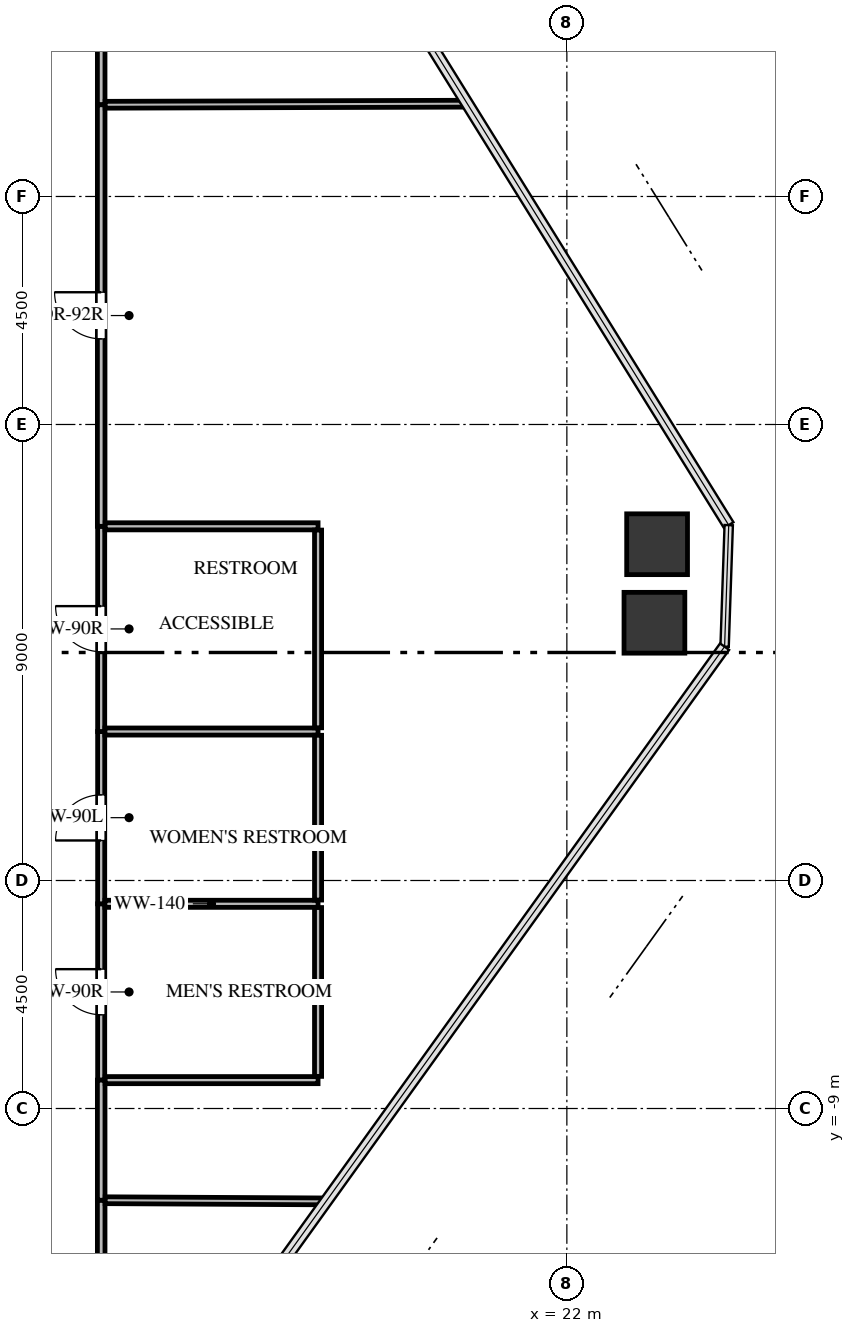
"""IFC4 building model, lengths in metres.
Left out: names, types, materials, properties, quantities, classifications, styles, units other than length and angle.
Written with IfcOpenShell. Run it as: python <this file> out.ifc"""

import sys

from ifc_helpers import new_model, si_unit, direction, frame, frame_2d, origin, origin_2d, place, context, subcontext, project, spatial, rectangle, extrude, source, transform, mapped, element, fill, save


model = new_model("IFC4")
c1 = context("Model", 3, precision=1e-05, world=origin(), true_north=direction((0.0, 1.0)))
c2 = subcontext(c1, "Body", "Model", "MODEL_VIEW")
j1 = project(units=[si_unit("LENGTHUNIT", "METRE"), si_unit("PLANEANGLEUNIT", "RADIAN")], contexts=[c1])
p1 = place(None, origin())
s1 = spatial("IfcSite", under=j1, at=p1, CompositionType="ELEMENT")
p2 = place(p1, origin())
s2 = spatial("IfcBuilding", under=s1, at=p2, CompositionType="ELEMENT")
p3 = place(p2, frame((0.0, 0.0, 93.3)))
s3 = spatial("IfcBuildingStorey", under=s2, at=p3, CompositionType="ELEMENT", Elevation=93.3)
m1 = source(origin(), c2, "Body", "SweptSolid", [
    extrude(rectangle(XDim=1.2, YDim=1.2, at=origin_2d()), origin(), (0.0, 0.0, 1.0), 4.26),
])
for number, where, z_axis, x_axis in (
    (1, (23.781, 2.137, -0.3), (0.0, 0.0, 1.0), (1.0, 0.0, 0.0)),
    (2, (23.728, 0.587, -0.3), (0.0, 0.0, 1.0), (1.0, 0.0, 0.0)),
):
    element("IfcColumn", number, at=place(p3, frame(where, z_axis=z_axis, x_axis=x_axis)), inside=s3, PredefinedType="COLUMN", context=c2, shape_type="MappedRepresentation", body=[
        mapped(m1, transform((0.0, 0.0, 0.0), x_axis=(1.0, 0.0, 0.0), y_axis=(0.0, 1.0, 0.0), z_axis=(0.0, 0.0, 1.0), scale=1.0)),
    ])
p4 = place(p3, frame((12.81, -8.44, 0.0), z_axis=(0.0, 0.0, 1.0), x_axis=(0.0, 1.0, 0.0)))
e3 = element("IfcWall", 3, at=p4, inside=s3, PredefinedType="PARTITIONING", context=c2, shape_type="SweptSolid", body=[
    extrude(rectangle(XDim=3.48, YDim=0.14, at=frame_2d((1.74, 0.0))), origin(), (0.0, 0.0, 1.0), 3.945),
])
p5 = place(p4, frame((1.29, 0.0, 0.0)))
e4 = element("IfcOpeningElement", 4, at=p5, cuts=e3, PredefinedType="OPENING", context=c2, shape_type="SweptSolid", body=[
    extrude(rectangle(XDim=0.9, YDim=2.05, at=frame_2d((0.45, 1.025))), frame((0.0, 0.08, 0.0), z_axis=(0.0, -1.0, 0.0), x_axis=(1.0, 0.0, 0.0)), (0.0, 0.0, 1.0), 0.16),
])
p6 = place(p3, frame((12.81, -4.96, 0.0), z_axis=(0.0, 0.0, 1.0), x_axis=(0.0, 1.0, 0.0)))
e5 = element("IfcWall", 5, at=p6, inside=s3, PredefinedType="PARTITIONING", context=c2, shape_type="SweptSolid", body=[
    extrude(rectangle(XDim=3.4, YDim=0.14, at=frame_2d((1.7, 0.0))), origin(), (0.0, 0.0, 1.0), 3.945),
])
p7 = place(p6, frame((1.25, 0.0, 0.0)))
e6 = element("IfcOpeningElement", 6, at=p7, cuts=e5, PredefinedType="OPENING", context=c2, shape_type="SweptSolid", body=[
    extrude(rectangle(XDim=0.9, YDim=2.05, at=frame_2d((0.45, 1.025))), frame((0.0, 0.08, 0.0), z_axis=(0.0, -1.0, 0.0), x_axis=(1.0, 0.0, 0.0)), (0.0, 0.0, 1.0), 0.16),
])
p8 = place(p3, frame((12.81, -1.56, 0.0), z_axis=(0.0, 0.0, 1.0), x_axis=(0.0, 1.0, 0.0)))
e7 = element("IfcWall", 7, at=p8, inside=s3, PredefinedType="PARTITIONING", context=c2, shape_type="SweptSolid", body=[
    extrude(rectangle(XDim=4.05, YDim=0.14, at=frame_2d((2.025, 0.0))), origin(), (0.0, 0.0, 1.0), 3.112),
])
p9 = place(p8, frame((1.575, 0.0, 0.0)))
e8 = element("IfcOpeningElement", 8, at=p9, cuts=e7, PredefinedType="OPENING", context=c2, shape_type="SweptSolid", body=[
    extrude(rectangle(XDim=0.9, YDim=2.05, at=frame_2d((0.45, 1.025))), frame((0.0, 0.08, 0.0), z_axis=(0.0, -1.0, 0.0), x_axis=(1.0, 0.0, 0.0)), (0.0, 0.0, 1.0), 0.16),
])
for number, where, z_axis, x_axis in (
    (9, (12.81, 10.81, 0.0), (0.0, 0.0, 1.0), (0.0, 1.0, 0.0)),
    (10, (12.81, -12.081, 0.0), (0.0, 0.0, 1.0), (0.0, 1.0, 0.0)),
):
    element("IfcWall", number, at=place(p3, frame(where, z_axis=z_axis, x_axis=x_axis)), inside=s3, PredefinedType="PARTITIONING", context=c2, shape_type="SweptSolid", body=[
        extrude(rectangle(XDim=1.271, YDim=0.15, at=frame_2d((0.635, 0.0))), origin(), (0.0, 0.0, 1.0), 3.945),
    ])
p10 = place(p3, frame((12.81, 2.49, 0.0), z_axis=(0.0, 0.0, 1.0), x_axis=(0.0, 1.0, 0.0)))
e11 = element("IfcWall", 11, at=p10, inside=s3, PredefinedType="PARTITIONING", context=c2, shape_type="SweptSolid", body=[
    extrude(rectangle(XDim=8.32, YDim=0.15, at=frame_2d((4.16, 0.0))), origin(), (0.0, 0.0, 1.0), 3.945),
])
p11 = place(p10, frame((3.7, 0.0, 0.0)))
e12 = element("IfcOpeningElement", 12, at=p11, cuts=e11, PredefinedType="OPENING", context=c2, shape_type="SweptSolid", body=[
    extrude(rectangle(XDim=0.92, YDim=2.1, at=frame_2d((0.46, 1.05))), frame((0.0, 0.085, 0.0), z_axis=(0.0, -1.0, 0.0), x_axis=(1.0, 0.0, 0.0)), (0.0, 0.0, 1.0), 0.17),
])
p12 = place(p3, frame((12.81, -10.81, 0.0), z_axis=(0.0, 0.0, 1.0), x_axis=(0.0, 1.0, 0.0)))
e13 = element("IfcWall", 13, at=p12, inside=s3, PredefinedType="PARTITIONING", context=c2, shape_type="SweptSolid", body=[
    extrude(rectangle(XDim=2.37, YDim=0.15, at=frame_2d((1.185, 0.0))), origin(), (0.0, 0.0, 1.0), 3.945),
])
p13 = place(p3, frame((12.884, -4.96, 0.0), z_axis=(0.0, 0.0, 1.0), x_axis=(1.0, 0.0, 0.0)))
e14 = element("IfcWall", 14, at=p13, inside=s3, PredefinedType="PARTITIONING", context=c2, shape_type="SweptSolid", body=[
    extrude(rectangle(XDim=4.206, YDim=0.14, at=frame_2d((2.103, 0.0))), origin(), (0.0, 0.0, 1.0), 3.945),
])
p14 = place(p3, frame((17.09, -8.44, 0.0), z_axis=(0.0, 0.0, 1.0), x_axis=(-1.0, 0.0, 0.0)))
e15 = element("IfcWall", 15, at=p14, inside=s3, PredefinedType="PARTITIONING", context=c2, shape_type="SweptSolid", body=[
    extrude(rectangle(XDim=4.201, YDim=0.14, at=frame_2d((2.101, 0.0))), origin(), (0.0, 0.0, 1.0), 3.28),
])
p15 = place(p3, frame((17.09, -5.034, 0.0), z_axis=(0.0, 0.0, 1.0), x_axis=(0.0, -1.0, 0.0)))
e16 = element("IfcWall", 16, at=p15, inside=s3, PredefinedType="PARTITIONING", context=c2, shape_type="SweptSolid", body=[
    extrude(rectangle(XDim=3.332, YDim=0.14, at=frame_2d((1.666, 0.0))), origin(), (0.0, 0.0, 1.0), 3.28),
])
p16 = place(p3, frame((12.884, -1.56, 0.0), z_axis=(0.0, 0.0, 1.0), x_axis=(1.0, 0.0, 0.0)))
e17 = element("IfcWall", 17, at=p16, inside=s3, PredefinedType="PARTITIONING", context=c2, shape_type="SweptSolid", body=[
    extrude(rectangle(XDim=4.206, YDim=0.14, at=frame_2d((2.103, 0.0))), origin(), (0.0, 0.0, 1.0), 3.945),
])
p17 = place(p3, frame((17.09, -1.634, 0.0), z_axis=(0.0, 0.0, 1.0), x_axis=(0.0, -1.0, 0.0)))
e18 = element("IfcWall", 18, at=p17, inside=s3, PredefinedType="PARTITIONING", context=c2, shape_type="SweptSolid", body=[
    extrude(rectangle(XDim=3.252, YDim=0.14, at=frame_2d((1.626, 0.0))), origin(), (0.0, 0.0, 1.0), 3.945),
])
p18 = place(p3, frame((12.889, 2.49, 0.0), z_axis=(0.0, 0.0, 1.0), x_axis=(1.0, 0.0, 0.0)))
e19 = element("IfcWall", 19, at=p18, inside=s3, PredefinedType="PARTITIONING", context=c2, shape_type="SweptSolid", body=[
    extrude(rectangle(XDim=4.201, YDim=0.14, at=frame_2d((2.101, 0.0))), origin(), (0.0, 0.0, 1.0), 3.945),
])
p19 = place(p3, frame((17.09, 2.416, 0.0), z_axis=(0.0, 0.0, 1.0), x_axis=(0.0, -1.0, 0.0)))
e20 = element("IfcWall", 20, at=p19, inside=s3, PredefinedType="PARTITIONING", context=c2, shape_type="SweptSolid", body=[
    extrude(rectangle(XDim=3.902, YDim=0.14, at=frame_2d((1.951, 0.0))), origin(), (0.0, 0.0, 1.0), 3.112),
])
p20 = place(p3, frame((20.035, 10.831, 0.0), z_axis=(0.0, 0.0, 1.0), x_axis=(-0.999995783715, -0.002903885812, 0.0)))
e21 = element("IfcWall", 21, at=p20, inside=s3, PredefinedType="PARTITIONING", context=c2, shape_type="SweptSolid", body=[
    extrude(rectangle(XDim=7.146, YDim=0.135, at=frame_2d((3.573, 0.0))), origin(), (0.0, 0.0, 1.0), 3.28),
])
p21 = place(p3, frame((12.889, -10.81, 0.0), z_axis=(0.0, 0.0, 1.0), x_axis=(0.999986140562, -0.005264853658, 0.0)))
e22 = element("IfcWall", 22, at=p21, inside=s3, PredefinedType="PARTITIONING", context=c2, shape_type="SweptSolid", body=[
    extrude(rectangle(XDim=4.359, YDim=0.135, at=frame_2d((2.179, 0.0))), origin(), (0.0, 0.0, 1.0), 3.28),
])
m2 = source(origin(), c2, "Body", "SweptSolid", [
    extrude(rectangle(XDim=0.9, YDim=2.05, at=frame_2d((0.45, 1.025))), frame((0.0, 0.025, 0.0), z_axis=(0.0, -1.0, 0.0), x_axis=(1.0, 0.0, 0.0)), (0.0, 0.0, 1.0), 0.05),
])
p22 = place(p5, origin())
e23 = element("IfcDoor", 23, at=p22, inside=s3, OperationType="SINGLE_SWING_RIGHT", PredefinedType="DOOR", context=c2, shape_type="MappedRepresentation", body=[
    mapped(m2, transform((0.0, 0.0, 0.0), x_axis=(1.0, 0.0, 0.0), y_axis=(0.0, 1.0, 0.0), z_axis=(0.0, 0.0, 1.0), scale=1.0)),
])
fill(e4, e23)
m3 = source(origin(), c2, "Body", "SweptSolid", [
    extrude(rectangle(XDim=0.9, YDim=2.05, at=frame_2d((0.45, 1.025))), frame((0.0, 0.025, 0.0), z_axis=(0.0, -1.0, 0.0), x_axis=(1.0, 0.0, 0.0)), (0.0, 0.0, 1.0), 0.05),
])
p23 = place(p7, origin())
e24 = element("IfcDoor", 24, at=p23, inside=s3, OperationType="SINGLE_SWING_LEFT", PredefinedType="DOOR", context=c2, shape_type="MappedRepresentation", body=[
    mapped(m3, transform((0.0, 0.0, 0.0), x_axis=(1.0, 0.0, 0.0), y_axis=(0.0, 1.0, 0.0), z_axis=(0.0, 0.0, 1.0), scale=1.0)),
])
fill(e6, e24)
p24 = place(p9, origin())
e25 = element("IfcDoor", 25, at=p24, inside=s3, OperationType="SINGLE_SWING_RIGHT", PredefinedType="DOOR", context=c2, shape_type="MappedRepresentation", body=[
    mapped(m2, transform((0.0, 0.0, 0.0), x_axis=(1.0, 0.0, 0.0), y_axis=(0.0, 1.0, 0.0), z_axis=(0.0, 0.0, 1.0), scale=1.0)),
])
fill(e8, e25)
m4 = source(origin(), c2, "Body", "SweptSolid", [
    extrude(rectangle(XDim=0.92, YDim=2.1, at=frame_2d((0.46, 1.05))), frame((0.0, 0.025, 0.0), z_axis=(0.0, -1.0, 0.0), x_axis=(1.0, 0.0, 0.0)), (0.0, 0.0, 1.0), 0.05),
])
p25 = place(p11, origin())
e26 = element("IfcDoor", 26, at=p25, inside=s3, OperationType="SINGLE_SWING_RIGHT", PredefinedType="DOOR", context=c2, shape_type="MappedRepresentation", body=[
    mapped(m4, transform((0.0, 0.0, 0.0), x_axis=(1.0, 0.0, 0.0), y_axis=(0.0, 1.0, 0.0), z_axis=(0.0, 0.0, 1.0), scale=1.0)),
])
fill(e12, e26)
save(model, sys.argv[1])
